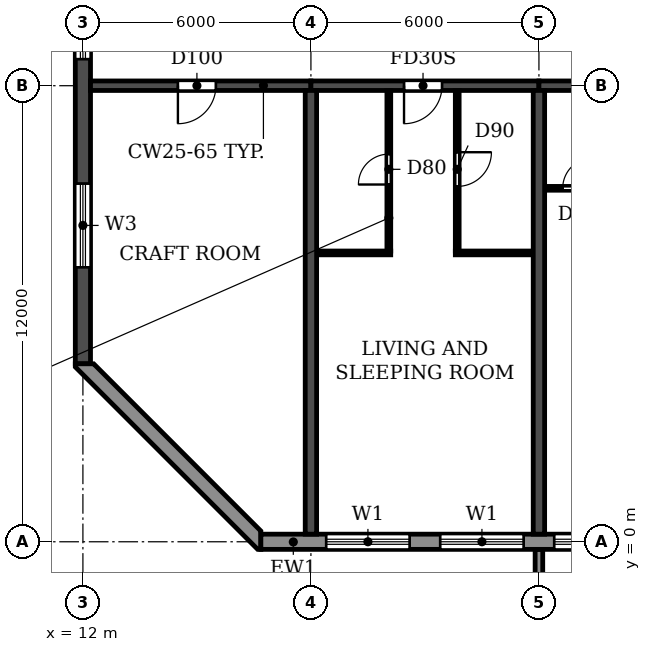
"""IFC4 building model, lengths in metres.
Left out: names, types, materials, properties, quantities, classifications, styles, units other than length and angle.
Written with IfcOpenShell. Run it as: python <this file> out.ifc"""

import sys

from ifc_helpers import new_model, si_unit, direction, frame, frame_2d, origin, place, context, subcontext, project, spatial, polyline, rectangle, outline, extrude, source, transform, mapped, element, fill, save


model = new_model("IFC4")
c1 = context("Model", 3, precision=1e-05, world=origin(), true_north=direction((0.0, 1.0)))
c2 = subcontext(c1, "Body", "Model", "MODEL_VIEW")
j1 = project(units=[si_unit("LENGTHUNIT", "METRE"), si_unit("PLANEANGLEUNIT", "RADIAN")], contexts=[c1])
p1 = place(None, origin())
s1 = spatial("IfcSite", under=j1, at=p1, CompositionType="ELEMENT")
p2 = place(p1, origin())
s2 = spatial("IfcBuilding", under=s1, at=p2, CompositionType="ELEMENT")
p3 = place(p2, frame((0.0, 0.0, 132.3)))
s3 = spatial("IfcBuildingStorey", under=s2, at=p3, CompositionType="ELEMENT", Elevation=132.3)
for number, where, z_axis, x_axis in (
    (1, (18.0, 0.2, 0.0), (0.0, 0.0, 1.0), (0.0, 1.0, 0.0)),
    (2, (24.0, 0.2, 0.0), (0.0, 0.0, 1.0), (0.0, 1.0, 0.0)),
):
    element("IfcWall", number, at=place(p3, frame(where, z_axis=z_axis, x_axis=x_axis)), inside=s3, PredefinedType="SHEAR", context=c2, shape_type="SweptSolid", body=[
        extrude(rectangle(XDim=11.675, YDim=0.3, at=frame_2d((5.837, 0.0))), origin(), (0.0, 0.0, 1.0), 3.07),
    ])
p4 = place(p3, frame((12.0, 4.683, 0.0), z_axis=(0.0, 0.0, 1.0), x_axis=(0.0, 1.0, 0.0)))
e3 = element("IfcWall", 3, at=p4, inside=s3, PredefinedType="SHEAR", context=c2, shape_type="SweptSolid", body=[
    extrude(rectangle(XDim=33.034, YDim=0.4, at=frame_2d((16.517, 0.0))), origin(), (0.0, 0.0, 1.0), 3.07),
])
p5 = place(p4, frame((23.817, 0.0, 0.9)))
e4 = element("IfcOpeningElement", 4, at=p5, cuts=e3, PredefinedType="OPENING", context=c2, shape_type="SweptSolid", body=[
    extrude(rectangle(XDim=1.2, YDim=1.5, at=frame_2d((0.6, 0.75))), frame((0.0, 0.21, 0.0), z_axis=(0.0, -1.0, 0.0), x_axis=(1.0, 0.0, 0.0)), (0.0, 0.0, 1.0), 0.42),
])
p6 = place(p4, frame((8.017, 0.0, 0.9)))
e5 = element("IfcOpeningElement", 5, at=p6, cuts=e3, PredefinedType="OPENING", context=c2, shape_type="SweptSolid", body=[
    extrude(rectangle(XDim=1.2, YDim=1.5, at=frame_2d((0.6, 0.75))), frame((0.0, 0.21, 0.0), z_axis=(0.0, -1.0, 0.0), x_axis=(1.0, 0.0, 0.0)), (0.0, 0.0, 1.0), 0.42),
])
p7 = place(p4, frame((28.293, 0.0, 0.6)))
e6 = element("IfcOpeningElement", 6, at=p7, cuts=e3, PredefinedType="OPENING", context=c2, shape_type="SweptSolid", body=[
    extrude(rectangle(XDim=2.2, YDim=1.8, at=frame_2d((1.1, 0.9))), frame((0.0, 0.21, 0.0), z_axis=(0.0, -1.0, 0.0), x_axis=(1.0, 0.0, 0.0)), (0.0, 0.0, 1.0), 0.42),
])
p8 = place(p4, frame((2.541, 0.0, 0.6)))
e7 = element("IfcOpeningElement", 7, at=p8, cuts=e3, PredefinedType="OPENING", context=c2, shape_type="SweptSolid", body=[
    extrude(rectangle(XDim=2.2, YDim=1.8, at=frame_2d((1.1, 0.9))), frame((0.0, 0.21, 0.0), z_axis=(0.0, -1.0, 0.0), x_axis=(1.0, 0.0, 0.0)), (0.0, 0.0, 1.0), 0.42),
])
p9 = place(p3, frame((12.2, 12.0, 0.0), z_axis=(0.0, 0.0, 1.0), x_axis=(1.0, 0.0, 0.0)))
e8 = element("IfcWall", 8, at=p9, inside=s3, PredefinedType="SHEAR", context=c2, shape_type="SweptSolid", body=[
    extrude(rectangle(XDim=5.8, YDim=0.25, at=frame_2d((2.9, 0.0))), origin(), (0.0, 0.0, 1.0), 2.47),
])
p10 = place(p9, frame((2.3, 0.0, 0.0)))
e9 = element("IfcOpeningElement", 9, at=p10, cuts=e8, PredefinedType="OPENING", context=c2, shape_type="SweptSolid", body=[
    extrude(rectangle(XDim=1.0, YDim=2.1, at=frame_2d((0.5, 1.05))), frame((0.0, 0.135, 0.0), z_axis=(0.0, -1.0, 0.0), x_axis=(1.0, 0.0, 0.0)), (0.0, 0.0, 1.0), 0.27),
])
p11 = place(p3, frame((18.0, 12.0, 0.0), z_axis=(0.0, 0.0, 1.0), x_axis=(1.0, 0.0, 0.0)))
e10 = element("IfcWall", 10, at=p11, inside=s3, PredefinedType="SHEAR", context=c2, shape_type="SweptSolid", body=[
    extrude(rectangle(XDim=6.0, YDim=0.25, at=frame_2d((3.0, 0.0))), origin(), (0.0, 0.0, 1.0), 2.47),
])
p12 = place(p11, frame((2.45, 0.0, 0.0)))
e11 = element("IfcOpeningElement", 11, at=p12, cuts=e10, PredefinedType="OPENING", context=c2, shape_type="SweptSolid", body=[
    extrude(rectangle(XDim=1.0, YDim=2.1, at=frame_2d((0.5, 1.05))), frame((0.0, 0.135, 0.0), z_axis=(0.0, -1.0, 0.0), x_axis=(1.0, 0.0, 0.0)), (0.0, 0.0, 1.0), 0.27),
])
p13 = place(p3, frame((24.0, 12.0, 0.0), z_axis=(0.0, 0.0, 1.0), x_axis=(1.0, 0.0, 0.0)))
e12 = element("IfcWall", 12, at=p13, inside=s3, PredefinedType="SHEAR", context=c2, shape_type="SweptSolid", body=[
    extrude(rectangle(XDim=6.0, YDim=0.25, at=frame_2d((3.0, 0.0))), origin(), (0.0, 0.0, 1.0), 2.47),
])
p14 = place(p13, frame((2.45, 0.0, 0.0)))
e13 = element("IfcOpeningElement", 13, at=p14, cuts=e12, PredefinedType="OPENING", context=c2, shape_type="SweptSolid", body=[
    extrude(rectangle(XDim=1.0, YDim=2.1, at=frame_2d((0.5, 1.05))), frame((0.0, 0.135, 0.0), z_axis=(0.0, -1.0, 0.0), x_axis=(1.0, 0.0, 0.0)), (0.0, 0.0, 1.0), 0.27),
])
p15 = place(p3, frame((16.683, 0.0, 0.0), z_axis=(0.0, 0.0, 1.0), x_axis=(1.0, 0.0, 0.0)))
e14 = element("IfcWall", 14, at=p15, inside=s3, PredefinedType="STANDARD", context=c2, shape_type="SweptSolid", body=[
    extrude(rectangle(XDim=68.634, YDim=0.4, at=frame_2d((34.317, 0.0))), origin(), (0.0, 0.0, 1.0), 3.07),
])
p16 = place(p15, frame((1.717, 0.0, 0.9)))
e15 = element("IfcOpeningElement", 15, at=p16, cuts=e14, PredefinedType="OPENING", context=c2, shape_type="SweptSolid", body=[
    extrude(rectangle(XDim=2.2, YDim=1.5, at=frame_2d((1.1, 0.75))), frame((0.0, 0.21, 0.0), z_axis=(0.0, -1.0, 0.0), x_axis=(1.0, 0.0, 0.0)), (0.0, 0.0, 1.0), 0.42),
])
p17 = place(p15, frame((4.717, 0.0, 0.9)))
e16 = element("IfcOpeningElement", 16, at=p17, cuts=e14, PredefinedType="OPENING", context=c2, shape_type="SweptSolid", body=[
    extrude(rectangle(XDim=2.2, YDim=1.5, at=frame_2d((1.1, 0.75))), frame((0.0, 0.21, 0.0), z_axis=(0.0, -1.0, 0.0), x_axis=(1.0, 0.0, 0.0)), (0.0, 0.0, 1.0), 0.42),
])
p18 = place(p15, frame((7.717, 0.0, 0.9)))
e17 = element("IfcOpeningElement", 17, at=p18, cuts=e14, PredefinedType="OPENING", context=c2, shape_type="SweptSolid", body=[
    extrude(rectangle(XDim=2.2, YDim=1.5, at=frame_2d((1.1, 0.75))), frame((0.0, 0.21, 0.0), z_axis=(0.0, -1.0, 0.0), x_axis=(1.0, 0.0, 0.0)), (0.0, 0.0, 1.0), 0.42),
])
p19 = place(p15, frame((10.917, 0.0, 0.0)))
e18 = element("IfcOpeningElement", 18, at=p19, cuts=e14, PredefinedType="OPENING", context=c2, shape_type="SweptSolid", body=[
    extrude(rectangle(XDim=1.8, YDim=2.4, at=frame_2d((0.9, 1.2))), frame((0.0, 0.21, 0.0), z_axis=(0.0, -1.0, 0.0), x_axis=(1.0, 0.0, 0.0)), (0.0, 0.0, 1.0), 0.42),
])
p20 = place(p15, frame((13.717, 0.0, 0.9)))
e19 = element("IfcOpeningElement", 19, at=p20, cuts=e14, PredefinedType="OPENING", context=c2, shape_type="SweptSolid", body=[
    extrude(rectangle(XDim=2.2, YDim=1.5, at=frame_2d((1.1, 0.75))), frame((0.0, 0.21, 0.0), z_axis=(0.0, -1.0, 0.0), x_axis=(1.0, 0.0, 0.0)), (0.0, 0.0, 1.0), 0.42),
])
p21 = place(p15, frame((16.717, 0.0, 0.9)))
e20 = element("IfcOpeningElement", 20, at=p21, cuts=e14, PredefinedType="OPENING", context=c2, shape_type="SweptSolid", body=[
    extrude(rectangle(XDim=2.2, YDim=1.5, at=frame_2d((1.1, 0.75))), frame((0.0, 0.21, 0.0), z_axis=(0.0, -1.0, 0.0), x_axis=(1.0, 0.0, 0.0)), (0.0, 0.0, 1.0), 0.42),
])
p22 = place(p15, frame((19.917, 0.0, 0.0)))
e21 = element("IfcOpeningElement", 21, at=p22, cuts=e14, PredefinedType="OPENING", context=c2, shape_type="SweptSolid", body=[
    extrude(rectangle(XDim=1.8, YDim=2.4, at=frame_2d((0.9, 1.2))), frame((0.0, 0.21, 0.0), z_axis=(0.0, -1.0, 0.0), x_axis=(1.0, 0.0, 0.0)), (0.0, 0.0, 1.0), 0.42),
])
p23 = place(p15, frame((22.717, 0.0, 0.9)))
e22 = element("IfcOpeningElement", 22, at=p23, cuts=e14, PredefinedType="OPENING", context=c2, shape_type="SweptSolid", body=[
    extrude(rectangle(XDim=2.2, YDim=1.5, at=frame_2d((1.1, 0.75))), frame((0.0, 0.21, 0.0), z_axis=(0.0, -1.0, 0.0), x_axis=(1.0, 0.0, 0.0)), (0.0, 0.0, 1.0), 0.42),
])
p24 = place(p15, frame((25.717, 0.0, 0.9)))
e23 = element("IfcOpeningElement", 23, at=p24, cuts=e14, PredefinedType="OPENING", context=c2, shape_type="SweptSolid", body=[
    extrude(rectangle(XDim=2.2, YDim=1.5, at=frame_2d((1.1, 0.75))), frame((0.0, 0.21, 0.0), z_axis=(0.0, -1.0, 0.0), x_axis=(1.0, 0.0, 0.0)), (0.0, 0.0, 1.0), 0.42),
])
p25 = place(p15, frame((28.717, 0.0, 0.9)))
e24 = element("IfcOpeningElement", 24, at=p25, cuts=e14, PredefinedType="OPENING", context=c2, shape_type="SweptSolid", body=[
    extrude(rectangle(XDim=2.2, YDim=1.5, at=frame_2d((1.1, 0.75))), frame((0.0, 0.21, 0.0), z_axis=(0.0, -1.0, 0.0), x_axis=(1.0, 0.0, 0.0)), (0.0, 0.0, 1.0), 0.42),
])
p26 = place(p15, frame((31.917, 0.0, 0.0)))
e25 = element("IfcOpeningElement", 25, at=p26, cuts=e14, PredefinedType="OPENING", context=c2, shape_type="SweptSolid", body=[
    extrude(rectangle(XDim=1.8, YDim=2.4, at=frame_2d((0.9, 1.2))), frame((0.0, 0.21, 0.0), z_axis=(0.0, -1.0, 0.0), x_axis=(1.0, 0.0, 0.0)), (0.0, 0.0, 1.0), 0.42),
])
p27 = place(p15, frame((34.717, 0.0, 0.9)))
e26 = element("IfcOpeningElement", 26, at=p27, cuts=e14, PredefinedType="OPENING", context=c2, shape_type="SweptSolid", body=[
    extrude(rectangle(XDim=2.2, YDim=1.5, at=frame_2d((1.1, 0.75))), frame((0.0, 0.21, 0.0), z_axis=(0.0, -1.0, 0.0), x_axis=(1.0, 0.0, 0.0)), (0.0, 0.0, 1.0), 0.42),
])
p28 = place(p15, frame((37.717, 0.0, 0.9)))
e27 = element("IfcOpeningElement", 27, at=p28, cuts=e14, PredefinedType="OPENING", context=c2, shape_type="SweptSolid", body=[
    extrude(rectangle(XDim=2.2, YDim=1.5, at=frame_2d((1.1, 0.75))), frame((0.0, 0.21, 0.0), z_axis=(0.0, -1.0, 0.0), x_axis=(1.0, 0.0, 0.0)), (0.0, 0.0, 1.0), 0.42),
])
p29 = place(p15, frame((40.717, 0.0, 0.9)))
e28 = element("IfcOpeningElement", 28, at=p29, cuts=e14, PredefinedType="OPENING", context=c2, shape_type="SweptSolid", body=[
    extrude(rectangle(XDim=2.2, YDim=1.5, at=frame_2d((1.1, 0.75))), frame((0.0, 0.21, 0.0), z_axis=(0.0, -1.0, 0.0), x_axis=(1.0, 0.0, 0.0)), (0.0, 0.0, 1.0), 0.42),
])
p30 = place(p15, frame((43.717, 0.0, 0.9)))
e29 = element("IfcOpeningElement", 29, at=p30, cuts=e14, PredefinedType="OPENING", context=c2, shape_type="SweptSolid", body=[
    extrude(rectangle(XDim=2.2, YDim=1.5, at=frame_2d((1.1, 0.75))), frame((0.0, 0.21, 0.0), z_axis=(0.0, -1.0, 0.0), x_axis=(1.0, 0.0, 0.0)), (0.0, 0.0, 1.0), 0.42),
])
p31 = place(p15, frame((46.917, 0.0, 0.0)))
e30 = element("IfcOpeningElement", 30, at=p31, cuts=e14, PredefinedType="OPENING", context=c2, shape_type="SweptSolid", body=[
    extrude(rectangle(XDim=1.8, YDim=2.4, at=frame_2d((0.9, 1.2))), frame((0.0, 0.21, 0.0), z_axis=(0.0, -1.0, 0.0), x_axis=(1.0, 0.0, 0.0)), (0.0, 0.0, 1.0), 0.42),
])
p32 = place(p15, frame((49.717, 0.0, 0.9)))
e31 = element("IfcOpeningElement", 31, at=p32, cuts=e14, PredefinedType="OPENING", context=c2, shape_type="SweptSolid", body=[
    extrude(rectangle(XDim=2.2, YDim=1.5, at=frame_2d((1.1, 0.75))), frame((0.0, 0.21, 0.0), z_axis=(0.0, -1.0, 0.0), x_axis=(1.0, 0.0, 0.0)), (0.0, 0.0, 1.0), 0.42),
])
p33 = place(p15, frame((52.717, 0.0, 0.9)))
e32 = element("IfcOpeningElement", 32, at=p33, cuts=e14, PredefinedType="OPENING", context=c2, shape_type="SweptSolid", body=[
    extrude(rectangle(XDim=2.2, YDim=1.5, at=frame_2d((1.1, 0.75))), frame((0.0, 0.21, 0.0), z_axis=(0.0, -1.0, 0.0), x_axis=(1.0, 0.0, 0.0)), (0.0, 0.0, 1.0), 0.42),
])
p34 = place(p15, frame((55.717, 0.0, 0.9)))
e33 = element("IfcOpeningElement", 33, at=p34, cuts=e14, PredefinedType="OPENING", context=c2, shape_type="SweptSolid", body=[
    extrude(rectangle(XDim=2.2, YDim=1.5, at=frame_2d((1.1, 0.75))), frame((0.0, 0.21, 0.0), z_axis=(0.0, -1.0, 0.0), x_axis=(1.0, 0.0, 0.0)), (0.0, 0.0, 1.0), 0.42),
])
p35 = place(p15, frame((58.917, 0.0, 0.0)))
e34 = element("IfcOpeningElement", 34, at=p35, cuts=e14, PredefinedType="OPENING", context=c2, shape_type="SweptSolid", body=[
    extrude(rectangle(XDim=1.8, YDim=2.4, at=frame_2d((0.9, 1.2))), frame((0.0, 0.21, 0.0), z_axis=(0.0, -1.0, 0.0), x_axis=(1.0, 0.0, 0.0)), (0.0, 0.0, 1.0), 0.42),
])
p36 = place(p15, frame((61.717, 0.0, 0.9)))
e35 = element("IfcOpeningElement", 35, at=p36, cuts=e14, PredefinedType="OPENING", context=c2, shape_type="SweptSolid", body=[
    extrude(rectangle(XDim=2.2, YDim=1.5, at=frame_2d((1.1, 0.75))), frame((0.0, 0.21, 0.0), z_axis=(0.0, -1.0, 0.0), x_axis=(1.0, 0.0, 0.0)), (0.0, 0.0, 1.0), 0.42),
])
p37 = place(p15, frame((64.717, 0.0, 0.9)))
e36 = element("IfcOpeningElement", 36, at=p37, cuts=e14, PredefinedType="OPENING", context=c2, shape_type="SweptSolid", body=[
    extrude(rectangle(XDim=2.2, YDim=1.5, at=frame_2d((1.1, 0.75))), frame((0.0, 0.21, 0.0), z_axis=(0.0, -1.0, 0.0), x_axis=(1.0, 0.0, 0.0)), (0.0, 0.0, 1.0), 0.42),
])
p38 = place(p3, origin())
e37 = element("IfcWall", 37, at=p38, inside=s3, PredefinedType="STANDARD", context=c2, shape_type="SweptSolid", body=[
    extrude(outline(polyline([(11.8, 4.683), (11.8, 4.6), (16.6, -0.2), (16.683, -0.2), (16.683, 0.283), (12.283, 4.683), (11.8, 4.683)])), origin(), (0.0, 0.0, 1.0), 3.07),
])
m1 = source(origin(), c2, "Body", "SweptSolid", [
    extrude(outline(polyline([(0.0, 0.0), (0.2, 0.0), (0.2, 1.65), (0.0, 1.65), (0.0, 0.0)])), origin(), (0.0, 0.0, 1.0), 3.1),
])
p39 = place(p3, frame((23.9, -1.85, 0.0)))
e38 = element("IfcWall", 38, at=p39, inside=s3, PredefinedType="STANDARD", context=c2, shape_type="MappedRepresentation", body=[
    mapped(m1, transform((0.0, 0.0, 0.0))),
])
p40 = place(p3, frame((18.16, 7.6, 0.0), z_axis=(0.0, 0.0, 1.0), x_axis=(1.0, 0.0, 0.0)))
e39 = element("IfcWall", 39, at=p40, inside=s3, PredefinedType="PARTITIONING", context=c2, shape_type="SweptSolid", body=[
    extrude(rectangle(XDim=1.94, YDim=0.1, at=frame_2d((0.97, 0.0))), origin(), (0.0, 0.0, 1.0), 3.07),
])
p41 = place(p3, frame((21.8, 7.6, 0.0), z_axis=(0.0, 0.0, 1.0), x_axis=(1.0, 0.0, 0.0)))
e40 = element("IfcWall", 40, at=p41, inside=s3, PredefinedType="PARTITIONING", context=c2, shape_type="SweptSolid", body=[
    extrude(rectangle(XDim=2.04, YDim=0.1, at=frame_2d((1.02, 0.0))), origin(), (0.0, 0.0, 1.0), 3.07),
])
p42 = place(p3, frame((24.16, 9.3, 0.0), z_axis=(0.0, 0.0, 1.0), x_axis=(1.0, 0.0, 0.0)))
e41 = element("IfcWall", 41, at=p42, inside=s3, PredefinedType="PARTITIONING", context=c2, shape_type="SweptSolid", body=[
    extrude(rectangle(XDim=1.94, YDim=0.1, at=frame_2d((0.97, 0.0))), origin(), (0.0, 0.0, 1.0), 3.07),
])
p43 = place(p42, frame((0.465, 0.0, 0.0)))
e42 = element("IfcOpeningElement", 42, at=p43, cuts=e41, PredefinedType="OPENING", context=c2, shape_type="SweptSolid", body=[
    extrude(rectangle(XDim=0.8, YDim=2.1, at=frame_2d((0.4, 1.05))), frame((0.0, 0.06, 0.0), z_axis=(0.0, -1.0, 0.0), x_axis=(1.0, 0.0, 0.0)), (0.0, 0.0, 1.0), 0.12),
])
p44 = place(p3, frame((20.05, 7.65, 0.0), z_axis=(0.0, 0.0, 1.0), x_axis=(0.0, 1.0, 0.0)))
e43 = element("IfcWall", 43, at=p44, inside=s3, PredefinedType="PARTITIONING", context=c2, shape_type="SweptSolid", body=[
    extrude(rectangle(XDim=4.215, YDim=0.1, at=frame_2d((2.107, 0.0))), origin(), (0.0, 0.0, 1.0), 3.07),
])
p45 = place(p44, frame((1.75, 0.0, 0.0)))
e44 = element("IfcOpeningElement", 44, at=p45, cuts=e43, PredefinedType="OPENING", context=c2, shape_type="SweptSolid", body=[
    extrude(rectangle(XDim=0.8, YDim=2.1, at=frame_2d((0.4, 1.05))), frame((0.0, 0.06, 0.0), z_axis=(0.0, -1.0, 0.0), x_axis=(1.0, 0.0, 0.0)), (0.0, 0.0, 1.0), 0.12),
])
p46 = place(p3, frame((21.85, 7.65, 0.0), z_axis=(0.0, 0.0, 1.0), x_axis=(0.0, 1.0, 0.0)))
e45 = element("IfcWall", 45, at=p46, inside=s3, PredefinedType="PARTITIONING", context=c2, shape_type="SweptSolid", body=[
    extrude(rectangle(XDim=4.215, YDim=0.1, at=frame_2d((2.107, 0.0))), origin(), (0.0, 0.0, 1.0), 3.07),
])
p47 = place(p46, frame((1.7, 0.0, 0.0)))
e46 = element("IfcOpeningElement", 46, at=p47, cuts=e45, PredefinedType="OPENING", context=c2, shape_type="SweptSolid", body=[
    extrude(rectangle(XDim=0.9, YDim=2.1, at=frame_2d((0.45, 1.05))), frame((0.0, 0.06, 0.0), z_axis=(0.0, -1.0, 0.0), x_axis=(1.0, 0.0, 0.0)), (0.0, 0.0, 1.0), 0.12),
])
p48 = place(p16, origin())
e47 = element("IfcWindow", 47, at=p48, inside=s3, PartitioningType="DOUBLE_PANEL_HORIZONTAL", PredefinedType="WINDOW", context=c2, shape_type="SweptSolid", body=[
    extrude(rectangle(XDim=2.2, YDim=1.5, at=frame_2d((1.1, 0.75))), frame((0.0, 0.03, 0.0), z_axis=(0.0, -1.0, 0.0), x_axis=(1.0, 0.0, 0.0)), (0.0, 0.0, 1.0), 0.06),
])
fill(e15, e47)
p49 = place(p17, origin())
e48 = element("IfcWindow", 48, at=p49, inside=s3, PartitioningType="DOUBLE_PANEL_HORIZONTAL", PredefinedType="WINDOW", context=c2, shape_type="SweptSolid", body=[
    extrude(rectangle(XDim=2.2, YDim=1.5, at=frame_2d((1.1, 0.75))), frame((0.0, 0.03, 0.0), z_axis=(0.0, -1.0, 0.0), x_axis=(1.0, 0.0, 0.0)), (0.0, 0.0, 1.0), 0.06),
])
fill(e16, e48)
p50 = place(p18, origin())
e49 = element("IfcWindow", 49, at=p50, inside=s3, PartitioningType="DOUBLE_PANEL_HORIZONTAL", PredefinedType="WINDOW", context=c2, shape_type="SweptSolid", body=[
    extrude(rectangle(XDim=2.2, YDim=1.5, at=frame_2d((1.1, 0.75))), frame((0.0, 0.03, 0.0), z_axis=(0.0, -1.0, 0.0), x_axis=(1.0, 0.0, 0.0)), (0.0, 0.0, 1.0), 0.06),
])
fill(e17, e49)
p51 = place(p6, origin())
e50 = element("IfcWindow", 50, at=p51, inside=s3, PartitioningType="SINGLE_PANEL", PredefinedType="WINDOW", context=c2, shape_type="SweptSolid", body=[
    extrude(rectangle(XDim=1.2, YDim=1.5, at=frame_2d((0.6, 0.75))), frame((0.0, 0.03, 0.0), z_axis=(0.0, -1.0, 0.0), x_axis=(1.0, 0.0, 0.0)), (0.0, 0.0, 1.0), 0.06),
])
fill(e5, e50)
p52 = place(p8, origin())
e51 = element("IfcWindow", 51, at=p52, inside=s3, PartitioningType="DOUBLE_PANEL_HORIZONTAL", PredefinedType="WINDOW", context=c2, shape_type="SweptSolid", body=[
    extrude(rectangle(XDim=2.2, YDim=1.8, at=frame_2d((1.1, 0.9))), frame((0.0, 0.03, 0.0), z_axis=(0.0, -1.0, 0.0), x_axis=(1.0, 0.0, 0.0)), (0.0, 0.0, 1.0), 0.06),
])
fill(e7, e51)
p53 = place(p10, frame((1.0, 0.0, 0.0), z_axis=(0.0, 0.0, 1.0), x_axis=(-1.0, 0.0, 0.0)))
e52 = element("IfcDoor", 52, at=p53, inside=s3, OperationType="SINGLE_SWING_RIGHT", PredefinedType="DOOR", context=c2, shape_type="SweptSolid", body=[
    extrude(rectangle(XDim=1.0, YDim=2.1, at=frame_2d((0.5, 1.05))), frame((0.0, 0.025, 0.0), z_axis=(0.0, -1.0, 0.0), x_axis=(1.0, 0.0, 0.0)), (0.0, 0.0, 1.0), 0.05),
])
fill(e9, e52)
p54 = place(p45, origin())
e53 = element("IfcDoor", 53, at=p54, inside=s3, OperationType="SINGLE_SWING_LEFT", PredefinedType="DOOR", context=c2, shape_type="SweptSolid", body=[
    extrude(rectangle(XDim=0.8, YDim=2.1, at=frame_2d((0.4, 1.05))), frame((0.0, 0.025, 0.0), z_axis=(0.0, -1.0, 0.0), x_axis=(1.0, 0.0, 0.0)), (0.0, 0.0, 1.0), 0.05),
])
fill(e44, e53)
p55 = place(p12, frame((1.0, 0.0, 0.0), z_axis=(0.0, 0.0, 1.0), x_axis=(-1.0, 0.0, 0.0)))
e54 = element("IfcDoor", 54, at=p55, inside=s3, OperationType="SINGLE_SWING_RIGHT", PredefinedType="DOOR", context=c2, shape_type="SweptSolid", body=[
    extrude(rectangle(XDim=1.0, YDim=2.1, at=frame_2d((0.5, 1.05))), frame((0.0, 0.025, 0.0), z_axis=(0.0, -1.0, 0.0), x_axis=(1.0, 0.0, 0.0)), (0.0, 0.0, 1.0), 0.05),
])
fill(e11, e54)
p56 = place(p47, frame((0.9, 0.0, 0.0), z_axis=(0.0, 0.0, 1.0), x_axis=(-1.0, 0.0, 0.0)))
e55 = element("IfcDoor", 55, at=p56, inside=s3, OperationType="SINGLE_SWING_LEFT", PredefinedType="DOOR", context=c2, shape_type="SweptSolid", body=[
    extrude(rectangle(XDim=0.9, YDim=2.1, at=frame_2d((0.45, 1.05))), frame((0.0, 0.025, 0.0), z_axis=(0.0, -1.0, 0.0), x_axis=(1.0, 0.0, 0.0)), (0.0, 0.0, 1.0), 0.05),
])
fill(e46, e55)
p57 = place(p43, origin())
e56 = element("IfcDoor", 56, at=p57, inside=s3, OperationType="SINGLE_SWING_RIGHT", PredefinedType="DOOR", context=c2, shape_type="SweptSolid", body=[
    extrude(rectangle(XDim=0.8, YDim=2.1, at=frame_2d((0.4, 1.05))), frame((0.0, 0.025, 0.0), z_axis=(0.0, -1.0, 0.0), x_axis=(1.0, 0.0, 0.0)), (0.0, 0.0, 1.0), 0.05),
])
fill(e42, e56)
save(model, sys.argv[1])
